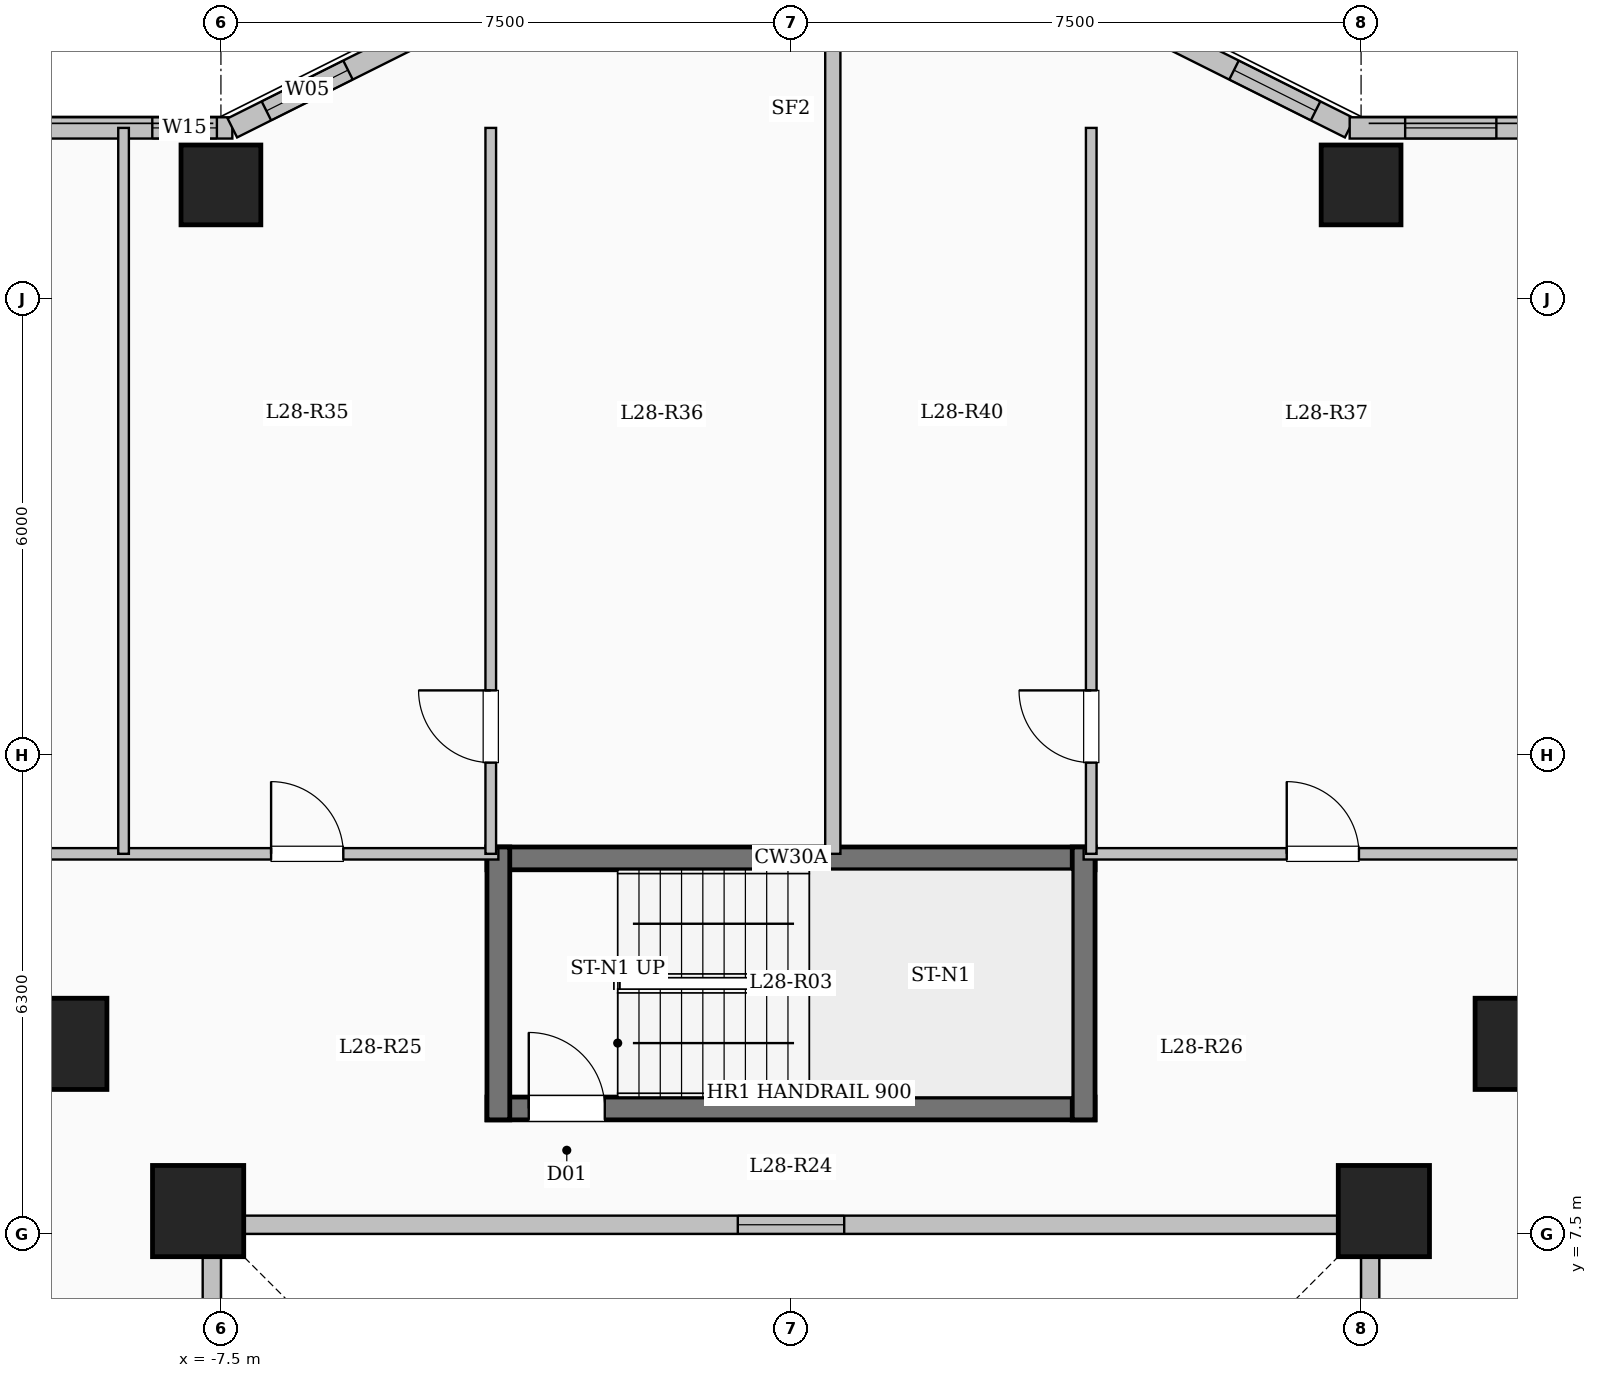
"""IFC4 building model, lengths in metres.
Left out: names, types, materials, properties, quantities, classifications, styles, units other than length and angle.
Written with IfcOpenShell. Run it as: python <this file> out.ifc"""

import sys

from ifc_helpers import new_model, si_unit, direction, frame, frame_2d, origin, origin_2d, place, context, subcontext, project, spatial, rectangle, extrude, element, fill, save


model = new_model("IFC4")
c1 = context("Model", 3, precision=1e-05, world=origin(), true_north=direction((0.0, 1.0)))
c2 = subcontext(c1, "Body", "Model", "MODEL_VIEW")
j1 = project(units=[si_unit("LENGTHUNIT", "METRE"), si_unit("PLANEANGLEUNIT", "RADIAN")], contexts=[c1])
p1 = place(None, origin())
s1 = spatial("IfcSite", under=j1, at=p1, CompositionType="ELEMENT")
p2 = place(p1, origin())
s2 = spatial("IfcBuilding", under=s1, at=p2, CompositionType="ELEMENT")
p3 = place(p2, frame((0.0, 0.0, 105.1)))
s3 = spatial("IfcBuildingStorey", under=s2, at=p3, CompositionType="ELEMENT", Elevation=105.1)
for number, where, z_axis, x_axis in (
    (1, (-7.8, 7.8, 0.0), (0.0, 0.0, 1.0), (1.0, 0.0, 0.0)),
    (2, (7.8, 7.8, 0.0), (0.0, 0.0, 1.0), (1.0, 0.0, 0.0)),
    (3, (-9.6, 10.0, 0.0), (0.0, 0.0, 1.0), (1.0, 0.0, 0.0)),
    (4, (9.6, 10.0, 0.0), (0.0, 0.0, 1.0), (1.0, 0.0, 0.0)),
):
    element("IfcColumn", number, at=place(p3, frame(where, z_axis=z_axis, x_axis=x_axis)), inside=s3, PredefinedType="COLUMN", context=c2, shape_type="SweptSolid", body=[
        extrude(rectangle(XDim=1.2, YDim=1.2, at=origin_2d()), origin(), (0.0, 0.0, 1.0), 3.35),
    ])
for number, where, z_axis, x_axis in (
    (5, (-7.5, 21.3, 0.0), (0.0, 0.0, 1.0), (1.0, 0.0, 0.0)),
    (6, (7.5, 21.3, 0.0), (0.0, 0.0, 1.0), (1.0, 0.0, 0.0)),
):
    element("IfcColumn", number, at=place(p3, frame(where, z_axis=z_axis, x_axis=x_axis)), inside=s3, PredefinedType="COLUMN", context=c2, shape_type="SweptSolid", body=[
        extrude(rectangle(XDim=1.05, YDim=1.05, at=origin_2d()), origin(), (0.0, 0.0, 1.0), 3.35),
    ])
p4 = place(p3, frame((7.62, -7.62, 0.0), z_axis=(0.0, 0.0, 1.0), x_axis=(0.0, 1.0, 0.0)))
e7 = element("IfcWall", 7, at=p4, inside=s3, PredefinedType="SOLIDWALL", context=c2, shape_type="SweptSolid", body=[
    extrude(rectangle(XDim=15.24, YDim=0.24, at=frame_2d((7.62, 0.0))), origin(), (0.0, 0.0, 1.0), 3.1),
])
p5 = place(p4, frame((6.92, 0.0, 0.95)))
e8 = element("IfcOpeningElement", 8, at=p5, cuts=e7, PredefinedType="OPENING", context=c2, shape_type="SweptSolid", body=[
    extrude(rectangle(XDim=1.4, YDim=1.5, at=frame_2d((0.7, 0.75))), frame((0.0, 0.13, 0.0), z_axis=(0.0, -1.0, 0.0), x_axis=(1.0, 0.0, 0.0)), (0.0, 0.0, 1.0), 0.26),
])
p6 = place(p3, frame((7.62, 7.62, 0.0), z_axis=(0.0, 0.0, 1.0), x_axis=(-1.0, 0.0, 0.0)))
e9 = element("IfcWall", 9, at=p6, inside=s3, PredefinedType="SOLIDWALL", context=c2, shape_type="SweptSolid", body=[
    extrude(rectangle(XDim=15.24, YDim=0.24, at=frame_2d((7.62, 0.0))), origin(), (0.0, 0.0, 1.0), 3.1),
])
p7 = place(p6, frame((6.92, 0.0, 0.95)))
e10 = element("IfcOpeningElement", 10, at=p7, cuts=e9, PredefinedType="OPENING", context=c2, shape_type="SweptSolid", body=[
    extrude(rectangle(XDim=1.4, YDim=1.5, at=frame_2d((0.7, 0.75))), frame((0.0, 0.13, 0.0), z_axis=(0.0, -1.0, 0.0), x_axis=(1.0, 0.0, 0.0)), (0.0, 0.0, 1.0), 0.26),
])
p8 = place(p3, frame((-7.62, 7.62, 0.0), z_axis=(0.0, 0.0, 1.0), x_axis=(0.0, -1.0, 0.0)))
e11 = element("IfcWall", 11, at=p8, inside=s3, PredefinedType="SOLIDWALL", context=c2, shape_type="SweptSolid", body=[
    extrude(rectangle(XDim=15.24, YDim=0.24, at=frame_2d((7.62, 0.0))), origin(), (0.0, 0.0, 1.0), 3.1),
])
p9 = place(p8, frame((6.92, 0.0, 0.95)))
e12 = element("IfcOpeningElement", 12, at=p9, cuts=e11, PredefinedType="OPENING", context=c2, shape_type="SweptSolid", body=[
    extrude(rectangle(XDim=1.4, YDim=1.5, at=frame_2d((0.7, 0.75))), frame((0.0, 0.13, 0.0), z_axis=(0.0, -1.0, 0.0), x_axis=(1.0, 0.0, 0.0)), (0.0, 0.0, 1.0), 0.26),
])
p10 = place(p3, frame((-21.15, 22.05, 0.0), z_axis=(0.0, 0.0, 1.0), x_axis=(1.0, 0.0, 0.0)))
e13 = element("IfcWall", 13, at=p10, inside=s3, PredefinedType="SOLIDWALL", context=c2, shape_type="SweptSolid", body=[
    extrude(rectangle(XDim=13.8, YDim=0.28, at=frame_2d((6.9, 0.0))), origin(), (0.0, 0.0, 1.0), 3.1),
])
p11 = place(p10, frame((2.136, 0.0, 0.9)))
e14 = element("IfcOpeningElement", 14, at=p11, cuts=e13, PredefinedType="OPENING", context=c2, shape_type="SweptSolid", body=[
    extrude(rectangle(XDim=2.0, YDim=1.7, at=frame_2d((1.0, 0.85))), frame((0.0, 0.15, 0.0), z_axis=(0.0, -1.0, 0.0), x_axis=(1.0, 0.0, 0.0)), (0.0, 0.0, 1.0), 0.3),
])
p12 = place(p10, frame((8.309, 0.0, 0.9)))
e15 = element("IfcOpeningElement", 15, at=p12, cuts=e13, PredefinedType="OPENING", context=c2, shape_type="SweptSolid", body=[
    extrude(rectangle(XDim=2.0, YDim=1.7, at=frame_2d((1.0, 0.85))), frame((0.0, 0.15, 0.0), z_axis=(0.0, -1.0, 0.0), x_axis=(1.0, 0.0, 0.0)), (0.0, 0.0, 1.0), 0.3),
])
p13 = place(p10, frame((12.747, 0.0, 0.95)))
e16 = element("IfcOpeningElement", 16, at=p13, cuts=e13, PredefinedType="OPENING", context=c2, shape_type="SweptSolid", body=[
    extrude(rectangle(XDim=0.85, YDim=1.5, at=frame_2d((0.425, 0.75))), frame((0.0, 0.15, 0.0), z_axis=(0.0, -1.0, 0.0), x_axis=(1.0, 0.0, 0.0)), (0.0, 0.0, 1.0), 0.3),
])
p14 = place(p3, frame((-7.35, 22.05, 0.0), z_axis=(0.0, 0.0, 1.0), x_axis=(0.894427191, 0.4472135955, 0.0)))
e17 = element("IfcWall", 17, at=p14, inside=s3, PredefinedType="SOLIDWALL", context=c2, shape_type="SweptSolid", body=[
    extrude(rectangle(XDim=3.354, YDim=0.28, at=frame_2d((1.677, 0.0))), origin(), (0.0, 0.0, 1.0), 3.1),
])
p15 = place(p14, frame((0.501, 0.0, 0.95)))
e18 = element("IfcOpeningElement", 18, at=p15, cuts=e17, PredefinedType="OPENING", context=c2, shape_type="SweptSolid", body=[
    extrude(rectangle(XDim=1.2, YDim=1.5, at=frame_2d((0.6, 0.75))), frame((0.0, 0.15, 0.0), z_axis=(0.0, -1.0, 0.0), x_axis=(1.0, 0.0, 0.0)), (0.0, 0.0, 1.0), 0.3),
])
p16 = place(p3, frame((4.35, 23.55, 0.0), z_axis=(0.0, 0.0, 1.0), x_axis=(0.894427191, -0.4472135955, 0.0)))
e19 = element("IfcWall", 19, at=p16, inside=s3, PredefinedType="SOLIDWALL", context=c2, shape_type="SweptSolid", body=[
    extrude(rectangle(XDim=3.354, YDim=0.28, at=frame_2d((1.677, 0.0))), origin(), (0.0, 0.0, 1.0), 3.1),
])
p17 = place(p16, frame((1.653, 0.0, 0.95)))
e20 = element("IfcOpeningElement", 20, at=p17, cuts=e19, PredefinedType="OPENING", context=c2, shape_type="SweptSolid", body=[
    extrude(rectangle(XDim=1.2, YDim=1.5, at=frame_2d((0.6, 0.75))), frame((0.0, 0.15, 0.0), z_axis=(0.0, -1.0, 0.0), x_axis=(1.0, 0.0, 0.0)), (0.0, 0.0, 1.0), 0.3),
])
p18 = place(p3, frame((7.35, 22.05, 0.0), z_axis=(0.0, 0.0, 1.0), x_axis=(1.0, 0.0, 0.0)))
e21 = element("IfcWall", 21, at=p18, inside=s3, PredefinedType="SOLIDWALL", context=c2, shape_type="SweptSolid", body=[
    extrude(rectangle(XDim=13.8, YDim=0.28, at=frame_2d((6.9, 0.0))), origin(), (0.0, 0.0, 1.0), 3.1),
])
p19 = place(p18, frame((0.73, 0.0, 0.95)))
e22 = element("IfcOpeningElement", 22, at=p19, cuts=e21, PredefinedType="OPENING", context=c2, shape_type="SweptSolid", body=[
    extrude(rectangle(XDim=1.2, YDim=1.5, at=frame_2d((0.6, 0.75))), frame((0.0, 0.15, 0.0), z_axis=(0.0, -1.0, 0.0), x_axis=(1.0, 0.0, 0.0)), (0.0, 0.0, 1.0), 0.3),
])
p20 = place(p18, frame((4.846, 0.0, 0.9)))
e23 = element("IfcOpeningElement", 23, at=p20, cuts=e21, PredefinedType="OPENING", context=c2, shape_type="SweptSolid", body=[
    extrude(rectangle(XDim=2.0, YDim=1.7, at=frame_2d((1.0, 0.85))), frame((0.0, 0.15, 0.0), z_axis=(0.0, -1.0, 0.0), x_axis=(1.0, 0.0, 0.0)), (0.0, 0.0, 1.0), 0.3),
])
p21 = place(p18, frame((10.441, 0.0, 0.9)))
e24 = element("IfcOpeningElement", 24, at=p21, cuts=e21, PredefinedType="OPENING", context=c2, shape_type="SweptSolid", body=[
    extrude(rectangle(XDim=1.8, YDim=1.65, at=frame_2d((0.9, 0.825))), frame((0.0, 0.15, 0.0), z_axis=(0.0, -1.0, 0.0), x_axis=(1.0, 0.0, 0.0)), (0.0, 0.0, 1.0), 0.3),
])
p22 = place(p3, frame((-4.0, 12.44, 0.0), z_axis=(0.0, 0.0, 1.0), x_axis=(1.0, 0.0, 0.0)))
e25 = element("IfcWall", 25, at=p22, inside=s3, PredefinedType="SHEAR", context=c2, shape_type="SweptSolid", body=[
    extrude(rectangle(XDim=8.0, YDim=0.3, at=frame_2d((4.0, 0.0))), origin(), (0.0, 0.0, 1.0), 3.35),
])
p23 = place(p3, frame((-4.0, 9.15, 0.0), z_axis=(0.0, 0.0, 1.0), x_axis=(1.0, 0.0, 0.0)))
e26 = element("IfcWall", 26, at=p23, inside=s3, PredefinedType="SHEAR", context=c2, shape_type="SweptSolid", body=[
    extrude(rectangle(XDim=8.0, YDim=0.3, at=frame_2d((4.0, 0.0))), origin(), (0.0, 0.0, 1.0), 3.35),
])
p24 = place(p23, frame((0.55, 0.0, 0.0)))
e27 = element("IfcOpeningElement", 27, at=p24, cuts=e26, PredefinedType="OPENING", context=c2, shape_type="SweptSolid", body=[
    extrude(rectangle(XDim=1.0, YDim=2.15, at=frame_2d((0.5, 1.075))), frame((0.0, 0.16, 0.0), z_axis=(0.0, -1.0, 0.0), x_axis=(1.0, 0.0, 0.0)), (0.0, 0.0, 1.0), 0.32),
])
for number, where, z_axis, x_axis in (
    (28, (-3.85, 9.0, 0.0), (0.0, 0.0, 1.0), (0.0, 1.0, 0.0)),
    (29, (3.85, 9.0, 0.0), (0.0, 0.0, 1.0), (0.0, 1.0, 0.0)),
):
    element("IfcWall", number, at=place(p3, frame(where, z_axis=z_axis, x_axis=x_axis)), inside=s3, PredefinedType="SHEAR", context=c2, shape_type="SweptSolid", body=[
        extrude(rectangle(XDim=3.59, YDim=0.3, at=frame_2d((1.795, 0.0))), origin(), (0.0, 0.0, 1.0), 3.35),
    ])
p25 = place(p3, frame((-21.05, 12.5, 0.0), z_axis=(0.0, 0.0, 1.0), x_axis=(1.0, 0.0, 0.0)))
e30 = element("IfcWall", 30, at=p25, inside=s3, PredefinedType="PARTITIONING", context=c2, shape_type="SweptSolid", body=[
    extrude(rectangle(XDim=17.2, YDim=0.15, at=frame_2d((8.6, 0.0))), origin(), (0.0, 0.0, 1.0), 3.1),
])
p26 = place(p25, frame((2.562, 0.0, 0.0)))
e31 = element("IfcOpeningElement", 31, at=p26, cuts=e30, PredefinedType="OPENING", context=c2, shape_type="SweptSolid", body=[
    extrude(rectangle(XDim=0.95, YDim=2.15, at=frame_2d((0.475, 1.075))), frame((0.0, 0.085, 0.0), z_axis=(0.0, -1.0, 0.0), x_axis=(1.0, 0.0, 0.0)), (0.0, 0.0, 1.0), 0.17),
])
p27 = place(p25, frame((8.726, 0.0, 0.0)))
e32 = element("IfcOpeningElement", 32, at=p27, cuts=e30, PredefinedType="OPENING", context=c2, shape_type="SweptSolid", body=[
    extrude(rectangle(XDim=0.95, YDim=2.15, at=frame_2d((0.475, 1.075))), frame((0.0, 0.085, 0.0), z_axis=(0.0, -1.0, 0.0), x_axis=(1.0, 0.0, 0.0)), (0.0, 0.0, 1.0), 0.17),
])
p28 = place(p25, frame((14.21, 0.0, 0.0)))
e33 = element("IfcOpeningElement", 33, at=p28, cuts=e30, PredefinedType="OPENING", context=c2, shape_type="SweptSolid", body=[
    extrude(rectangle(XDim=0.95, YDim=2.15, at=frame_2d((0.475, 1.075))), frame((0.0, 0.085, 0.0), z_axis=(0.0, -1.0, 0.0), x_axis=(1.0, 0.0, 0.0)), (0.0, 0.0, 1.0), 0.17),
])
p29 = place(p3, frame((3.85, 12.5, 0.0), z_axis=(0.0, 0.0, 1.0), x_axis=(1.0, 0.0, 0.0)))
e34 = element("IfcWall", 34, at=p29, inside=s3, PredefinedType="PARTITIONING", context=c2, shape_type="SweptSolid", body=[
    extrude(rectangle(XDim=17.2, YDim=0.15, at=frame_2d((8.6, 0.0))), origin(), (0.0, 0.0, 1.0), 3.1),
])
p30 = place(p29, frame((2.672, 0.0, 0.0)))
e35 = element("IfcOpeningElement", 35, at=p30, cuts=e34, PredefinedType="OPENING", context=c2, shape_type="SweptSolid", body=[
    extrude(rectangle(XDim=0.95, YDim=2.15, at=frame_2d((0.475, 1.075))), frame((0.0, 0.085, 0.0), z_axis=(0.0, -1.0, 0.0), x_axis=(1.0, 0.0, 0.0)), (0.0, 0.0, 1.0), 0.17),
])
p31 = place(p29, frame((8.837, 0.0, 0.0)))
e36 = element("IfcOpeningElement", 36, at=p31, cuts=e34, PredefinedType="OPENING", context=c2, shape_type="SweptSolid", body=[
    extrude(rectangle(XDim=0.95, YDim=2.15, at=frame_2d((0.475, 1.075))), frame((0.0, 0.085, 0.0), z_axis=(0.0, -1.0, 0.0), x_axis=(1.0, 0.0, 0.0)), (0.0, 0.0, 1.0), 0.17),
])
p32 = place(p29, frame((14.319, 0.0, 0.0)))
e37 = element("IfcOpeningElement", 37, at=p32, cuts=e34, PredefinedType="OPENING", context=c2, shape_type="SweptSolid", body=[
    extrude(rectangle(XDim=0.95, YDim=2.15, at=frame_2d((0.475, 1.075))), frame((0.0, 0.085, 0.0), z_axis=(0.0, -1.0, 0.0), x_axis=(1.0, 0.0, 0.0)), (0.0, 0.0, 1.0), 0.17),
])
p33 = place(p3, frame((0.55, 12.5, 0.0), z_axis=(0.0, 0.0, 1.0), x_axis=(0.0, 1.0, 0.0)))
e38 = element("IfcWall", 38, at=p33, inside=s3, PredefinedType="SOLIDWALL", context=c2, shape_type="SweptSolid", body=[
    extrude(rectangle(XDim=11.08, YDim=0.2, at=frame_2d((5.54, 0.0))), origin(), (0.0, 0.0, 1.0), 3.1),
])
p34 = place(p3, frame((-3.95, 12.5, 0.0), z_axis=(0.0, 0.0, 1.0), x_axis=(0.0, 1.0, 0.0)))
e39 = element("IfcWall", 39, at=p34, inside=s3, PredefinedType="PARTITIONING", context=c2, shape_type="SweptSolid", body=[
    extrude(rectangle(XDim=9.55, YDim=0.14, at=frame_2d((4.775, 0.0))), origin(), (0.0, 0.0, 1.0), 3.1),
])
p35 = place(p34, frame((1.2, 0.0, 0.0)))
e40 = element("IfcOpeningElement", 40, at=p35, cuts=e39, PredefinedType="OPENING", context=c2, shape_type="SweptSolid", body=[
    extrude(rectangle(XDim=0.95, YDim=2.15, at=frame_2d((0.475, 1.075))), frame((0.0, 0.08, 0.0), z_axis=(0.0, -1.0, 0.0), x_axis=(1.0, 0.0, 0.0)), (0.0, 0.0, 1.0), 0.16),
])
p36 = place(p3, frame((-8.781, 12.5, 0.0), z_axis=(0.0, 0.0, 1.0), x_axis=(0.0, 1.0, 0.0)))
e41 = element("IfcWall", 41, at=p36, inside=s3, PredefinedType="PARTITIONING", context=c2, shape_type="SweptSolid", body=[
    extrude(rectangle(XDim=9.55, YDim=0.14, at=frame_2d((4.775, 0.0))), origin(), (0.0, 0.0, 1.0), 3.1),
])
p37 = place(p3, frame((3.95, 12.5, 0.0), z_axis=(0.0, 0.0, 1.0), x_axis=(0.0, 1.0, 0.0)))
e42 = element("IfcWall", 42, at=p37, inside=s3, PredefinedType="PARTITIONING", context=c2, shape_type="SweptSolid", body=[
    extrude(rectangle(XDim=9.55, YDim=0.14, at=frame_2d((4.775, 0.0))), origin(), (0.0, 0.0, 1.0), 3.1),
])
p38 = place(p37, frame((1.2, 0.0, 0.0)))
e43 = element("IfcOpeningElement", 43, at=p38, cuts=e42, PredefinedType="OPENING", context=c2, shape_type="SweptSolid", body=[
    extrude(rectangle(XDim=0.95, YDim=2.15, at=frame_2d((0.475, 1.075))), frame((0.0, 0.08, 0.0), z_axis=(0.0, -1.0, 0.0), x_axis=(1.0, 0.0, 0.0)), (0.0, 0.0, 1.0), 0.16),
])
p39 = place(p7, origin())
e44 = element("IfcWindow", 44, at=p39, inside=s3, PartitioningType="SINGLE_PANEL", PredefinedType="WINDOW", context=c2, shape_type="SweptSolid", body=[
    extrude(rectangle(XDim=1.4, YDim=1.5, at=frame_2d((0.7, 0.75))), frame((0.0, 0.03, 0.0), z_axis=(0.0, -1.0, 0.0), x_axis=(1.0, 0.0, 0.0)), (0.0, 0.0, 1.0), 0.06),
])
fill(e10, e44)
p40 = place(p13, origin())
e45 = element("IfcWindow", 45, at=p40, inside=s3, PartitioningType="SINGLE_PANEL", PredefinedType="WINDOW", context=c2, shape_type="SweptSolid", body=[
    extrude(rectangle(XDim=0.85, YDim=1.5, at=frame_2d((0.425, 0.75))), frame((0.0, 0.03, 0.0), z_axis=(0.0, -1.0, 0.0), x_axis=(1.0, 0.0, 0.0)), (0.0, 0.0, 1.0), 0.06),
])
fill(e16, e45)
p41 = place(p15, origin())
e46 = element("IfcWindow", 46, at=p41, inside=s3, PartitioningType="SINGLE_PANEL", PredefinedType="WINDOW", context=c2, shape_type="SweptSolid", body=[
    extrude(rectangle(XDim=1.2, YDim=1.5, at=frame_2d((0.6, 0.75))), frame((0.0, 0.03, 0.0), z_axis=(0.0, -1.0, 0.0), x_axis=(1.0, 0.0, 0.0)), (0.0, 0.0, 1.0), 0.06),
])
fill(e18, e46)
p42 = place(p17, origin())
e47 = element("IfcWindow", 47, at=p42, inside=s3, PartitioningType="SINGLE_PANEL", PredefinedType="WINDOW", context=c2, shape_type="SweptSolid", body=[
    extrude(rectangle(XDim=1.2, YDim=1.5, at=frame_2d((0.6, 0.75))), frame((0.0, 0.03, 0.0), z_axis=(0.0, -1.0, 0.0), x_axis=(1.0, 0.0, 0.0)), (0.0, 0.0, 1.0), 0.06),
])
fill(e20, e47)
p43 = place(p19, origin())
e48 = element("IfcWindow", 48, at=p43, inside=s3, PartitioningType="SINGLE_PANEL", PredefinedType="WINDOW", context=c2, shape_type="SweptSolid", body=[
    extrude(rectangle(XDim=1.2, YDim=1.5, at=frame_2d((0.6, 0.75))), frame((0.0, 0.03, 0.0), z_axis=(0.0, -1.0, 0.0), x_axis=(1.0, 0.0, 0.0)), (0.0, 0.0, 1.0), 0.06),
])
fill(e22, e48)
p44 = place(p24, origin())
e49 = element("IfcDoor", 49, at=p44, inside=s3, OperationType="SINGLE_SWING_LEFT", PredefinedType="DOOR", context=c2, shape_type="SweptSolid", body=[
    extrude(rectangle(XDim=1.0, YDim=2.15, at=frame_2d((0.5, 1.075))), frame((0.0, 0.025, 0.0), z_axis=(0.0, -1.0, 0.0), x_axis=(1.0, 0.0, 0.0)), (0.0, 0.0, 1.0), 0.05),
])
fill(e27, e49)
p45 = place(p28, origin())
e50 = element("IfcDoor", 50, at=p45, inside=s3, OperationType="SINGLE_SWING_LEFT", PredefinedType="DOOR", context=c2, shape_type="SweptSolid", body=[
    extrude(rectangle(XDim=0.95, YDim=2.15, at=frame_2d((0.475, 1.075))), frame((0.0, 0.025, 0.0), z_axis=(0.0, -1.0, 0.0), x_axis=(1.0, 0.0, 0.0)), (0.0, 0.0, 1.0), 0.05),
])
fill(e33, e50)
p46 = place(p35, origin())
e51 = element("IfcDoor", 51, at=p46, inside=s3, OperationType="SINGLE_SWING_RIGHT", PredefinedType="DOOR", context=c2, shape_type="SweptSolid", body=[
    extrude(rectangle(XDim=0.95, YDim=2.15, at=frame_2d((0.475, 1.075))), frame((0.0, 0.025, 0.0), z_axis=(0.0, -1.0, 0.0), x_axis=(1.0, 0.0, 0.0)), (0.0, 0.0, 1.0), 0.05),
])
fill(e40, e51)
p47 = place(p30, origin())
e52 = element("IfcDoor", 52, at=p47, inside=s3, OperationType="SINGLE_SWING_LEFT", PredefinedType="DOOR", context=c2, shape_type="SweptSolid", body=[
    extrude(rectangle(XDim=0.95, YDim=2.15, at=frame_2d((0.475, 1.075))), frame((0.0, 0.025, 0.0), z_axis=(0.0, -1.0, 0.0), x_axis=(1.0, 0.0, 0.0)), (0.0, 0.0, 1.0), 0.05),
])
fill(e35, e52)
p48 = place(p38, origin())
e53 = element("IfcDoor", 53, at=p48, inside=s3, OperationType="SINGLE_SWING_RIGHT", PredefinedType="DOOR", context=c2, shape_type="SweptSolid", body=[
    extrude(rectangle(XDim=0.95, YDim=2.15, at=frame_2d((0.475, 1.075))), frame((0.0, 0.025, 0.0), z_axis=(0.0, -1.0, 0.0), x_axis=(1.0, 0.0, 0.0)), (0.0, 0.0, 1.0), 0.05),
])
fill(e43, e53)
save(model, sys.argv[1])
